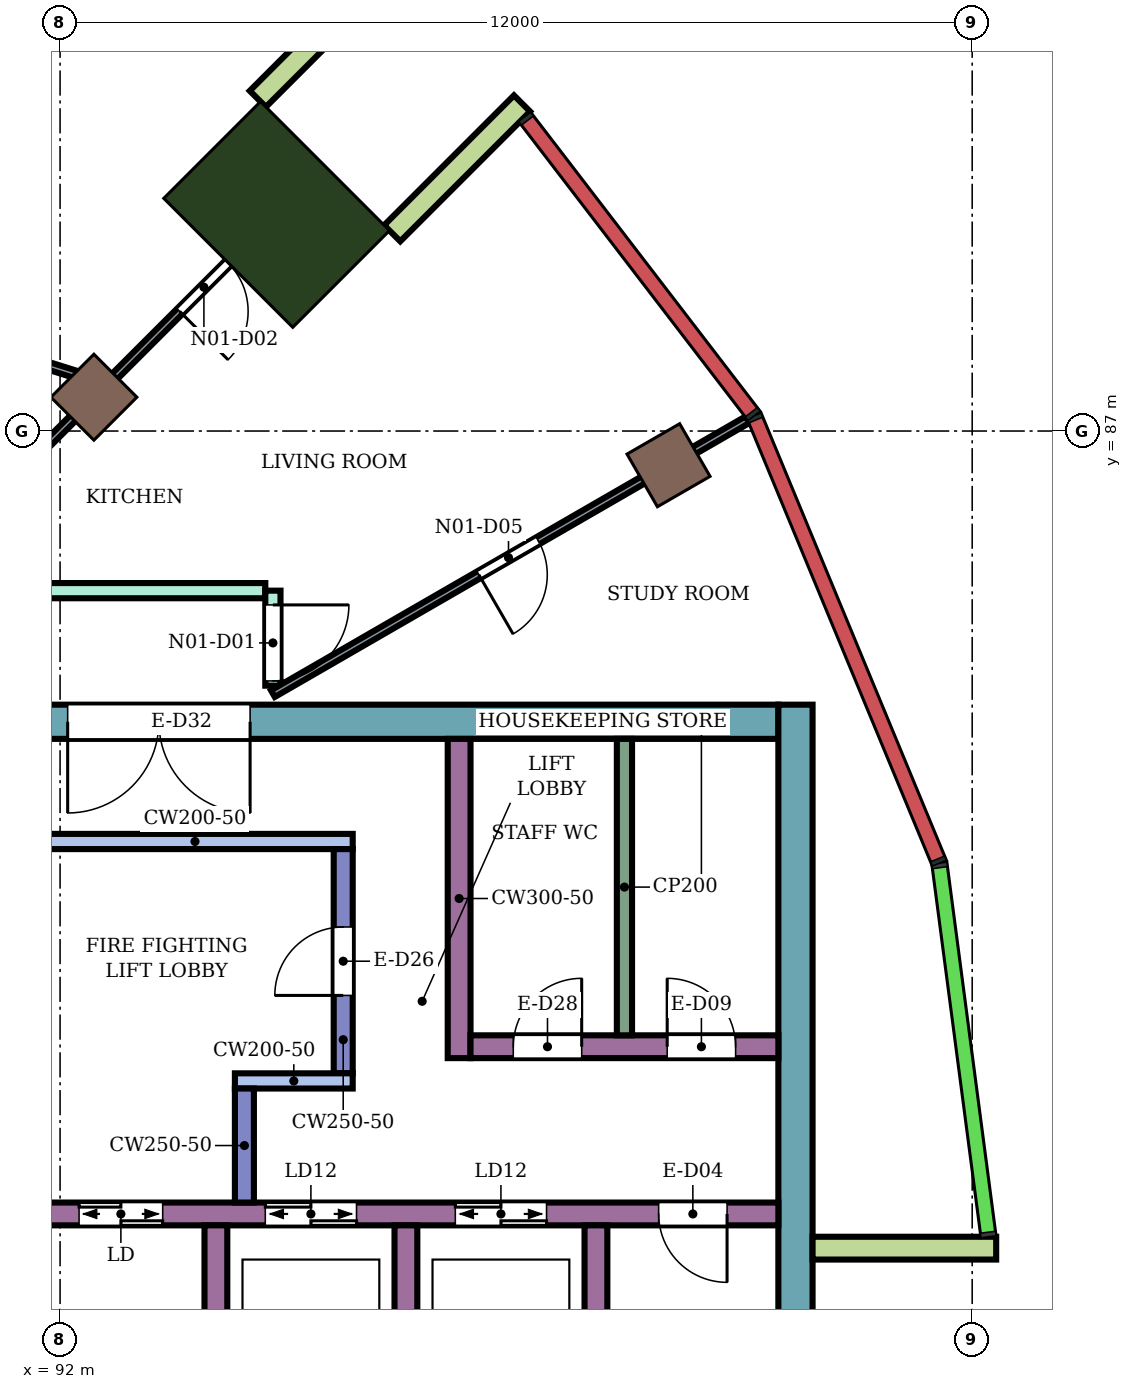
"""IFC4 building model, lengths in metres.
Left out: names, types, materials, properties, quantities, classifications, styles, units other than length and angle.
Written with IfcOpenShell. Run it as: python <this file> out.ifc"""

import sys

from ifc_helpers import new_model, si_unit, direction, frame, frame_2d, origin, origin_2d, place, context, subcontext, project, spatial, rectangle, extrude, element, fill, save


model = new_model("IFC4")
c1 = context("Model", 3, precision=1e-05, world=origin(), true_north=direction((0.0, 1.0)))
c2 = subcontext(c1, "Body", "Model", "MODEL_VIEW")
j1 = project(units=[si_unit("LENGTHUNIT", "METRE"), si_unit("PLANEANGLEUNIT", "RADIAN")], contexts=[c1])
p1 = place(None, origin())
s1 = spatial("IfcSite", under=j1, at=p1, CompositionType="ELEMENT")
p2 = place(p1, origin())
s2 = spatial("IfcBuilding", under=s1, at=p2, CompositionType="ELEMENT")
p3 = place(p2, frame((0.0, 0.0, 284.1)))
s3 = spatial("IfcBuildingStorey", under=s2, at=p3, CompositionType="ELEMENT", Elevation=284.1)
for number, where, z_axis, x_axis in (
    (1, (100.005, 86.55, 0.0), (0.0, 0.0, 1.0), (0.866, 0.5, 0.0)),
    (2, (92.445, 87.445, 0.0), (0.0, 0.0, 1.0), (0.707, 0.707, 0.0)),
):
    element("IfcColumn", number, at=place(p3, frame(where, z_axis=z_axis, x_axis=x_axis)), inside=s3, PredefinedType="COLUMN", context=c2, shape_type="SweptSolid", body=[
        extrude(rectangle(XDim=0.8, YDim=0.8, at=origin_2d()), origin(), (0.0, 0.0, 1.0), 4.2),
    ])
p4 = place(p3, frame((94.849, 89.849, 0.0), z_axis=(0.0, 0.0, 1.0), x_axis=(0.707106781187, 0.707106781187, 0.0)))
e3 = element("IfcColumn", 3, at=p4, inside=s3, PredefinedType="COLUMN", context=c2, shape_type="SweptSolid", body=[
    extrude(rectangle(XDim=1.8, YDim=2.4, at=origin_2d()), origin(), (0.0, 0.0, 1.0), 4.2),
])
p5 = place(p3, frame((87.9, 83.175, 0.0), z_axis=(0.0, 0.0, 1.0), x_axis=(1.0, 0.0, 0.0)))
e4 = element("IfcWall", 4, at=p5, inside=s3, PredefinedType="SHEAR", context=c2, shape_type="SweptSolid", body=[
    extrude(rectangle(XDim=13.55, YDim=0.45, at=frame_2d((6.775, 0.0))), origin(), (0.0, 0.0, 1.0), 3.88),
])
p6 = place(p5, frame((4.2, 0.0, 0.0)))
e5 = element("IfcOpeningElement", 5, at=p6, cuts=e4, PredefinedType="OPENING", context=c2, shape_type="SweptSolid", body=[
    extrude(rectangle(XDim=2.4, YDim=2.4, at=frame_2d((1.2, 1.2))), frame((0.0, 0.235, 0.0), z_axis=(0.0, -1.0, 0.0), x_axis=(1.0, 0.0, 0.0)), (0.0, 0.0, 1.0), 0.47),
])
p7 = place(p3, frame((101.675, 66.6, 0.0), z_axis=(0.0, 0.0, 1.0), x_axis=(0.0, 1.0, 0.0)))
e6 = element("IfcWall", 6, at=p7, inside=s3, PredefinedType="SHEAR", context=c2, shape_type="SweptSolid", body=[
    extrude(rectangle(XDim=16.8, YDim=0.45, at=frame_2d((8.4, 0.0))), origin(), (0.0, 0.0, 1.0), 3.88),
])
p8 = place(p3, frame((91.7, 76.7, 0.0), z_axis=(0.0, 0.0, 1.0), x_axis=(1.0, 0.0, 0.0)))
e7 = element("IfcWall", 7, at=p8, inside=s3, PredefinedType="SHEAR", context=c2, shape_type="SweptSolid", body=[
    extrude(rectangle(XDim=9.75, YDim=0.3, at=frame_2d((4.875, 0.0))), origin(), (0.0, 0.0, 1.0), 3.88),
])
p9 = place(p8, frame((0.55, 0.0, 0.0)))
e8 = element("IfcOpeningElement", 8, at=p9, cuts=e7, PredefinedType="OPENING", context=c2, shape_type="SweptSolid", body=[
    extrude(rectangle(XDim=1.1, YDim=2.1, at=frame_2d((0.55, 1.05))), frame((0.0, 0.16, 0.0), z_axis=(0.0, -1.0, 0.0), x_axis=(1.0, 0.0, 0.0)), (0.0, 0.0, 1.0), 0.32),
])
p10 = place(p8, frame((3.0, 0.0, 0.0)))
e9 = element("IfcOpeningElement", 9, at=p10, cuts=e7, PredefinedType="OPENING", context=c2, shape_type="SweptSolid", body=[
    extrude(rectangle(XDim=1.2, YDim=2.1, at=frame_2d((0.6, 1.05))), frame((0.0, 0.16, 0.0), z_axis=(0.0, -1.0, 0.0), x_axis=(1.0, 0.0, 0.0)), (0.0, 0.0, 1.0), 0.32),
])
p11 = place(p8, frame((5.5, 0.0, 0.0)))
e10 = element("IfcOpeningElement", 10, at=p11, cuts=e7, PredefinedType="OPENING", context=c2, shape_type="SweptSolid", body=[
    extrude(rectangle(XDim=1.2, YDim=2.1, at=frame_2d((0.6, 1.05))), frame((0.0, 0.16, 0.0), z_axis=(0.0, -1.0, 0.0), x_axis=(1.0, 0.0, 0.0)), (0.0, 0.0, 1.0), 0.32),
])
p12 = place(p8, frame((8.175, 0.0, 0.0)))
e11 = element("IfcOpeningElement", 11, at=p12, cuts=e7, PredefinedType="OPENING", context=c2, shape_type="SweptSolid", body=[
    extrude(rectangle(XDim=0.9, YDim=2.1, at=frame_2d((0.45, 1.05))), frame((0.0, 0.16, 0.0), z_axis=(0.0, -1.0, 0.0), x_axis=(1.0, 0.0, 0.0)), (0.0, 0.0, 1.0), 0.32),
])
for number, where, z_axis, x_axis in (
    (12, (94.05, 74.0, 0.0), (0.0, 0.0, 1.0), (0.0, 1.0, 0.0)),
    (13, (96.55, 74.0, 0.0), (0.0, 0.0, 1.0), (0.0, 1.0, 0.0)),
    (14, (99.05, 74.0, 0.0), (0.0, 0.0, 1.0), (0.0, 1.0, 0.0)),
):
    element("IfcWall", number, at=place(p3, frame(where, z_axis=z_axis, x_axis=x_axis)), inside=s3, PredefinedType="SHEAR", context=c2, shape_type="SweptSolid", body=[
        extrude(rectangle(XDim=2.55, YDim=0.3, at=frame_2d((1.275, 0.0))), origin(), (0.0, 0.0, 1.0), 3.88),
    ])
p13 = place(p3, frame((91.7, 81.6, 0.0), z_axis=(0.0, 0.0, 1.0), x_axis=(1.0, 0.0, 0.0)))
e15 = element("IfcWall", 15, at=p13, inside=s3, PredefinedType="SHEAR", context=c2, shape_type="SweptSolid", body=[
    extrude(rectangle(XDim=4.15, YDim=0.2, at=frame_2d((2.075, 0.0))), origin(), (0.0, 0.0, 1.0), 3.88),
])
p14 = place(p3, frame((95.725, 78.55, 0.0), z_axis=(0.0, 0.0, 1.0), x_axis=(0.0, 1.0, 0.0)))
e16 = element("IfcWall", 16, at=p14, inside=s3, PredefinedType="SHEAR", context=c2, shape_type="SweptSolid", body=[
    extrude(rectangle(XDim=2.95, YDim=0.25, at=frame_2d((1.475, 0.0))), origin(), (0.0, 0.0, 1.0), 3.88),
])
p15 = place(p14, frame((1.025, 0.0, 0.0)))
e17 = element("IfcOpeningElement", 17, at=p15, cuts=e16, PredefinedType="OPENING", context=c2, shape_type="SweptSolid", body=[
    extrude(rectangle(XDim=0.9, YDim=2.1, at=frame_2d((0.45, 1.05))), frame((0.0, 0.135, 0.0), z_axis=(0.0, -1.0, 0.0), x_axis=(1.0, 0.0, 0.0)), (0.0, 0.0, 1.0), 0.27),
])
p16 = place(p3, frame((94.3, 78.45, 0.0), z_axis=(0.0, 0.0, 1.0), x_axis=(1.0, 0.0, 0.0)))
e18 = element("IfcWall", 18, at=p16, inside=s3, PredefinedType="SHEAR", context=c2, shape_type="SweptSolid", body=[
    extrude(rectangle(XDim=1.55, YDim=0.2, at=frame_2d((0.775, 0.0))), origin(), (0.0, 0.0, 1.0), 3.88),
])
p17 = place(p3, frame((94.425, 76.85, 0.0), z_axis=(0.0, 0.0, 1.0), x_axis=(0.0, 1.0, 0.0)))
e19 = element("IfcWall", 19, at=p17, inside=s3, PredefinedType="SHEAR", context=c2, shape_type="SweptSolid", body=[
    extrude(rectangle(XDim=1.5, YDim=0.25, at=frame_2d((0.75, 0.0))), origin(), (0.0, 0.0, 1.0), 3.88),
])
p18 = place(p3, frame((97.25, 78.75, 0.0), z_axis=(0.0, 0.0, 1.0), x_axis=(0.0, 1.0, 0.0)))
e20 = element("IfcWall", 20, at=p18, inside=s3, PredefinedType="SHEAR", context=c2, shape_type="SweptSolid", body=[
    extrude(rectangle(XDim=4.2, YDim=0.3, at=frame_2d((2.1, 0.0))), origin(), (0.0, 0.0, 1.0), 3.88),
])
p19 = place(p3, frame((97.4, 78.9, 0.0), z_axis=(0.0, 0.0, 1.0), x_axis=(1.0, 0.0, 0.0)))
e21 = element("IfcWall", 21, at=p19, inside=s3, PredefinedType="SHEAR", context=c2, shape_type="SweptSolid", body=[
    extrude(rectangle(XDim=4.05, YDim=0.3, at=frame_2d((2.025, 0.0))), origin(), (0.0, 0.0, 1.0), 3.88),
])
p20 = place(p19, frame((0.562, 0.0, 0.0)))
e22 = element("IfcOpeningElement", 22, at=p20, cuts=e21, PredefinedType="OPENING", context=c2, shape_type="SweptSolid", body=[
    extrude(rectangle(XDim=0.9, YDim=2.1, at=frame_2d((0.45, 1.05))), frame((0.0, 0.16, 0.0), z_axis=(0.0, -1.0, 0.0), x_axis=(1.0, 0.0, 0.0)), (0.0, 0.0, 1.0), 0.32),
])
p21 = place(p19, frame((2.587, 0.0, 0.0)))
e23 = element("IfcOpeningElement", 23, at=p21, cuts=e21, PredefinedType="OPENING", context=c2, shape_type="SweptSolid", body=[
    extrude(rectangle(XDim=0.9, YDim=2.1, at=frame_2d((0.45, 1.05))), frame((0.0, 0.16, 0.0), z_axis=(0.0, -1.0, 0.0), x_axis=(1.0, 0.0, 0.0)), (0.0, 0.0, 1.0), 0.32),
])
p22 = place(p3, frame((101.9, 76.25, 0.0), z_axis=(0.0, 0.0, 1.0), x_axis=(1.0, 0.0, 0.0)))
e24 = element("IfcWall", 24, at=p22, inside=s3, PredefinedType="NOTDEFINED", context=c2, shape_type="SweptSolid", body=[
    extrude(rectangle(XDim=2.416, YDim=0.3, at=frame_2d((1.208, 0.0))), origin(), (0.0, 0.0, 1.0), 4.2),
])
for number, where, z_axis, x_axis in (
    (25, (96.37, 89.602, 0.0), (0.0, 0.0, 1.0), (0.707, 0.707, 0.0)),
    (26, (94.602, 91.37, 0.0), (0.0, 0.0, 1.0), (0.707, 0.707, 0.0)),
):
    element("IfcWall", number, at=place(p3, frame(where, z_axis=z_axis, x_axis=x_axis)), inside=s3, PredefinedType="NOTDEFINED", context=c2, shape_type="SweptSolid", body=[
        extrude(rectangle(XDim=2.416, YDim=0.3, at=frame_2d((1.208, 0.0))), origin(), (0.0, 0.0, 1.0), 4.2),
    ])
p23 = place(p3, frame((86.678, 86.562, 0.0), z_axis=(0.0, 0.0, 1.0), x_axis=(0.500133037155, 0.865948581122, 0.0)))
e27 = element("IfcWall", 27, at=p23, inside=s3, PredefinedType="PARTITIONING", context=c2, shape_type="SweptSolid", body=[
    extrude(rectangle(XDim=10.946, YDim=0.2, at=frame_2d((5.473, 0.0))), origin(), (0.0, 0.0, 1.0), 3.75),
])
p24 = place(p3, frame((91.8, 84.9, 0.0), z_axis=(0.0, 0.0, 1.0), x_axis=(1.0, 0.0, 0.0)))
e28 = element("IfcWall", 28, at=p24, inside=s3, PredefinedType="PARTITIONING", context=c2, shape_type="SweptSolid", body=[
    extrude(rectangle(XDim=2.9, YDim=0.2, at=frame_2d((1.45, 0.0))), origin(), (0.0, 0.0, 1.0), 3.75),
])
p25 = place(p3, frame((94.8, 83.65, 0.0), z_axis=(0.0, 0.0, 1.0), x_axis=(0.0, 1.0, 0.0)))
e29 = element("IfcWall", 29, at=p25, inside=s3, PredefinedType="PARTITIONING", context=c2, shape_type="SweptSolid", body=[
    extrude(rectangle(XDim=1.25, YDim=0.2, at=frame_2d((0.625, 0.0))), origin(), (0.0, 0.0, 1.0), 3.75),
])
p26 = place(p25, frame((0.062, 0.0, 0.0)))
e30 = element("IfcOpeningElement", 30, at=p26, cuts=e29, PredefinedType="OPENING", context=c2, shape_type="SweptSolid", body=[
    extrude(rectangle(XDim=1.0, YDim=2.1, at=frame_2d((0.5, 1.05))), frame((0.0, 0.11, 0.0), z_axis=(0.0, -1.0, 0.0), x_axis=(1.0, 0.0, 0.0)), (0.0, 0.0, 1.0), 0.22),
])
p27 = place(p3, frame((88.207, 88.999, 0.0), z_axis=(0.0, 0.0, 1.0), x_axis=(0.954166656768, -0.29927577769, 0.0)))
e31 = element("IfcWall", 31, at=p27, inside=s3, PredefinedType="PARTITIONING", context=c2, shape_type="SweptSolid", body=[
    extrude(rectangle(XDim=4.542, YDim=0.1, at=frame_2d((2.271, 0.0))), origin(), (0.0, 0.0, 1.0), 3.75),
])
p28 = place(p27, frame((0.592, 0.0, 0.0)))
e32 = element("IfcOpeningElement", 32, at=p28, cuts=e31, PredefinedType="OPENING", context=c2, shape_type="SweptSolid", body=[
    extrude(rectangle(XDim=0.8, YDim=2.1, at=frame_2d((0.4, 1.05))), frame((0.0, 0.06, 0.0), z_axis=(0.0, -1.0, 0.0), x_axis=(1.0, 0.0, 0.0)), (0.0, 0.0, 1.0), 0.12),
])
p29 = place(p27, frame((2.732, 0.0, 0.0)))
e33 = element("IfcOpeningElement", 33, at=p29, cuts=e31, PredefinedType="OPENING", context=c2, shape_type="SweptSolid", body=[
    extrude(rectangle(XDim=0.8, YDim=2.1, at=frame_2d((0.4, 1.05))), frame((0.0, 0.06, 0.0), z_axis=(0.0, -1.0, 0.0), x_axis=(1.0, 0.0, 0.0)), (0.0, 0.0, 1.0), 0.12),
])
p30 = place(p3, frame((90.395, 85.395, 0.0), z_axis=(0.0, 0.0, 1.0), x_axis=(0.707106781187, 0.707106781187, 0.0)))
e34 = element("IfcWall", 34, at=p30, inside=s3, PredefinedType="PARTITIONING", context=c2, shape_type="SweptSolid", body=[
    extrude(rectangle(XDim=7.0, YDim=0.1, at=frame_2d((3.5, 0.0))), origin(), (0.0, 0.0, 1.0), 3.75),
])
p31 = place(p30, frame((4.496, 0.0, 0.0)))
e35 = element("IfcOpeningElement", 35, at=p31, cuts=e34, PredefinedType="OPENING", context=c2, shape_type="SweptSolid", body=[
    extrude(rectangle(XDim=0.9, YDim=2.1, at=frame_2d((0.45, 1.05))), frame((0.0, 0.06, 0.0), z_axis=(0.0, -1.0, 0.0), x_axis=(1.0, 0.0, 0.0)), (0.0, 0.0, 1.0), 0.12),
])
p32 = place(p3, frame((94.8, 83.545, 0.0), z_axis=(0.0, 0.0, 1.0), x_axis=(0.866044015472, 0.499967762227, 0.0)))
e36 = element("IfcWall", 36, at=p32, inside=s3, PredefinedType="PARTITIONING", context=c2, shape_type="SweptSolid", body=[
    extrude(rectangle(XDim=7.208, YDim=0.1, at=frame_2d((3.604, 0.0))), origin(), (0.0, 0.0, 1.0), 3.75),
])
p33 = place(p32, frame((3.129, 0.0, 0.0)))
e37 = element("IfcOpeningElement", 37, at=p33, cuts=e36, PredefinedType="OPENING", context=c2, shape_type="SweptSolid", body=[
    extrude(rectangle(XDim=0.9, YDim=2.1, at=frame_2d((0.45, 1.05))), frame((0.0, 0.06, 0.0), z_axis=(0.0, -1.0, 0.0), x_axis=(1.0, 0.0, 0.0)), (0.0, 0.0, 1.0), 0.12),
])
p34 = place(p3, frame((99.425, 79.05, 0.0), z_axis=(0.0, 0.0, 1.0), x_axis=(0.0, 1.0, 0.0)))
e38 = element("IfcWall", 38, at=p34, inside=s3, PredefinedType="PARTITIONING", context=c2, shape_type="SweptSolid", body=[
    extrude(rectangle(XDim=3.9, YDim=0.2, at=frame_2d((1.95, 0.0))), origin(), (0.0, 0.0, 1.0), 3.88),
])
p35 = place(p26, frame((1.0, 0.0, 0.0), z_axis=(0.0, 0.0, 1.0), x_axis=(-1.0, 0.0, 0.0)))
e39 = element("IfcDoor", 39, at=p35, inside=s3, OperationType="SINGLE_SWING_LEFT", PredefinedType="DOOR", context=c2, shape_type="SweptSolid", body=[
    extrude(rectangle(XDim=1.0, YDim=2.1, at=frame_2d((0.5, 1.05))), frame((0.0, 0.025, 0.0), z_axis=(0.0, -1.0, 0.0), x_axis=(1.0, 0.0, 0.0)), (0.0, 0.0, 1.0), 0.05),
])
fill(e30, e39)
p36 = place(p31, frame((0.9, 0.0, 0.0), z_axis=(0.0, 0.0, 1.0), x_axis=(-1.0, 0.0, 0.0)))
e40 = element("IfcDoor", 40, at=p36, inside=s3, OperationType="SINGLE_SWING_RIGHT", PredefinedType="DOOR", context=c2, shape_type="SweptSolid", body=[
    extrude(rectangle(XDim=0.9, YDim=2.1, at=frame_2d((0.45, 1.05))), frame((0.0, 0.025, 0.0), z_axis=(0.0, -1.0, 0.0), x_axis=(1.0, 0.0, 0.0)), (0.0, 0.0, 1.0), 0.05),
])
fill(e35, e40)
p37 = place(p33, frame((0.9, 0.0, 0.0), z_axis=(0.0, 0.0, 1.0), x_axis=(-1.0, 0.0, 0.0)))
e41 = element("IfcDoor", 41, at=p37, inside=s3, OperationType="SINGLE_SWING_RIGHT", PredefinedType="DOOR", context=c2, shape_type="SweptSolid", body=[
    extrude(rectangle(XDim=0.9, YDim=2.1, at=frame_2d((0.45, 1.05))), frame((0.0, 0.025, 0.0), z_axis=(0.0, -1.0, 0.0), x_axis=(1.0, 0.0, 0.0)), (0.0, 0.0, 1.0), 0.05),
])
fill(e37, e41)
p38 = place(p9, origin())
e42 = element("IfcDoor", 42, at=p38, inside=s3, OperationType="DOUBLE_DOOR_SLIDING", PredefinedType="DOOR", context=c2, shape_type="SweptSolid", body=[
    extrude(rectangle(XDim=1.1, YDim=2.1, at=frame_2d((0.55, 1.05))), frame((0.0, 0.025, 0.0), z_axis=(0.0, -1.0, 0.0), x_axis=(1.0, 0.0, 0.0)), (0.0, 0.0, 1.0), 0.05),
])
fill(e8, e42)
p39 = place(p10, origin())
e43 = element("IfcDoor", 43, at=p39, inside=s3, OperationType="DOUBLE_DOOR_SLIDING", PredefinedType="DOOR", context=c2, shape_type="SweptSolid", body=[
    extrude(rectangle(XDim=1.2, YDim=2.1, at=frame_2d((0.6, 1.05))), frame((0.0, 0.025, 0.0), z_axis=(0.0, -1.0, 0.0), x_axis=(1.0, 0.0, 0.0)), (0.0, 0.0, 1.0), 0.05),
])
fill(e9, e43)
p40 = place(p11, origin())
e44 = element("IfcDoor", 44, at=p40, inside=s3, OperationType="DOUBLE_DOOR_SLIDING", PredefinedType="DOOR", context=c2, shape_type="SweptSolid", body=[
    extrude(rectangle(XDim=1.2, YDim=2.1, at=frame_2d((0.6, 1.05))), frame((0.0, 0.025, 0.0), z_axis=(0.0, -1.0, 0.0), x_axis=(1.0, 0.0, 0.0)), (0.0, 0.0, 1.0), 0.05),
])
fill(e10, e44)
p41 = place(p12, frame((0.9, 0.0, 0.0), z_axis=(0.0, 0.0, 1.0), x_axis=(-1.0, 0.0, 0.0)))
e45 = element("IfcDoor", 45, at=p41, inside=s3, OperationType="SINGLE_SWING_LEFT", PredefinedType="DOOR", context=c2, shape_type="SweptSolid", body=[
    extrude(rectangle(XDim=0.9, YDim=2.1, at=frame_2d((0.45, 1.05))), frame((0.0, 0.025, 0.0), z_axis=(0.0, -1.0, 0.0), x_axis=(1.0, 0.0, 0.0)), (0.0, 0.0, 1.0), 0.05),
])
fill(e11, e45)
p42 = place(p15, origin())
e46 = element("IfcDoor", 46, at=p42, inside=s3, OperationType="SINGLE_SWING_LEFT", PredefinedType="DOOR", context=c2, shape_type="SweptSolid", body=[
    extrude(rectangle(XDim=0.9, YDim=2.1, at=frame_2d((0.45, 1.05))), frame((0.0, 0.025, 0.0), z_axis=(0.0, -1.0, 0.0), x_axis=(1.0, 0.0, 0.0)), (0.0, 0.0, 1.0), 0.05),
])
fill(e17, e46)
p43 = place(p20, origin())
e47 = element("IfcDoor", 47, at=p43, inside=s3, OperationType="SINGLE_SWING_RIGHT", PredefinedType="DOOR", context=c2, shape_type="SweptSolid", body=[
    extrude(rectangle(XDim=0.9, YDim=2.1, at=frame_2d((0.45, 1.05))), frame((0.0, 0.025, 0.0), z_axis=(0.0, -1.0, 0.0), x_axis=(1.0, 0.0, 0.0)), (0.0, 0.0, 1.0), 0.05),
])
fill(e22, e47)
p44 = place(p21, origin())
e48 = element("IfcDoor", 48, at=p44, inside=s3, OperationType="SINGLE_SWING_LEFT", PredefinedType="DOOR", context=c2, shape_type="SweptSolid", body=[
    extrude(rectangle(XDim=0.9, YDim=2.1, at=frame_2d((0.45, 1.05))), frame((0.0, 0.025, 0.0), z_axis=(0.0, -1.0, 0.0), x_axis=(1.0, 0.0, 0.0)), (0.0, 0.0, 1.0), 0.05),
])
fill(e23, e48)
p45 = place(p6, frame((2.4, 0.0, 0.0), z_axis=(0.0, 0.0, 1.0), x_axis=(-1.0, 0.0, 0.0)))
e49 = element("IfcDoor", 49, at=p45, inside=s3, OperationType="DOUBLE_DOOR_SINGLE_SWING", PredefinedType="DOOR", context=c2, shape_type="SweptSolid", body=[
    extrude(rectangle(XDim=2.4, YDim=2.4, at=frame_2d((1.2, 1.2))), frame((0.0, 0.025, 0.0), z_axis=(0.0, -1.0, 0.0), x_axis=(1.0, 0.0, 0.0)), (0.0, 0.0, 1.0), 0.05),
])
fill(e5, e49)
save(model, sys.argv[1])
